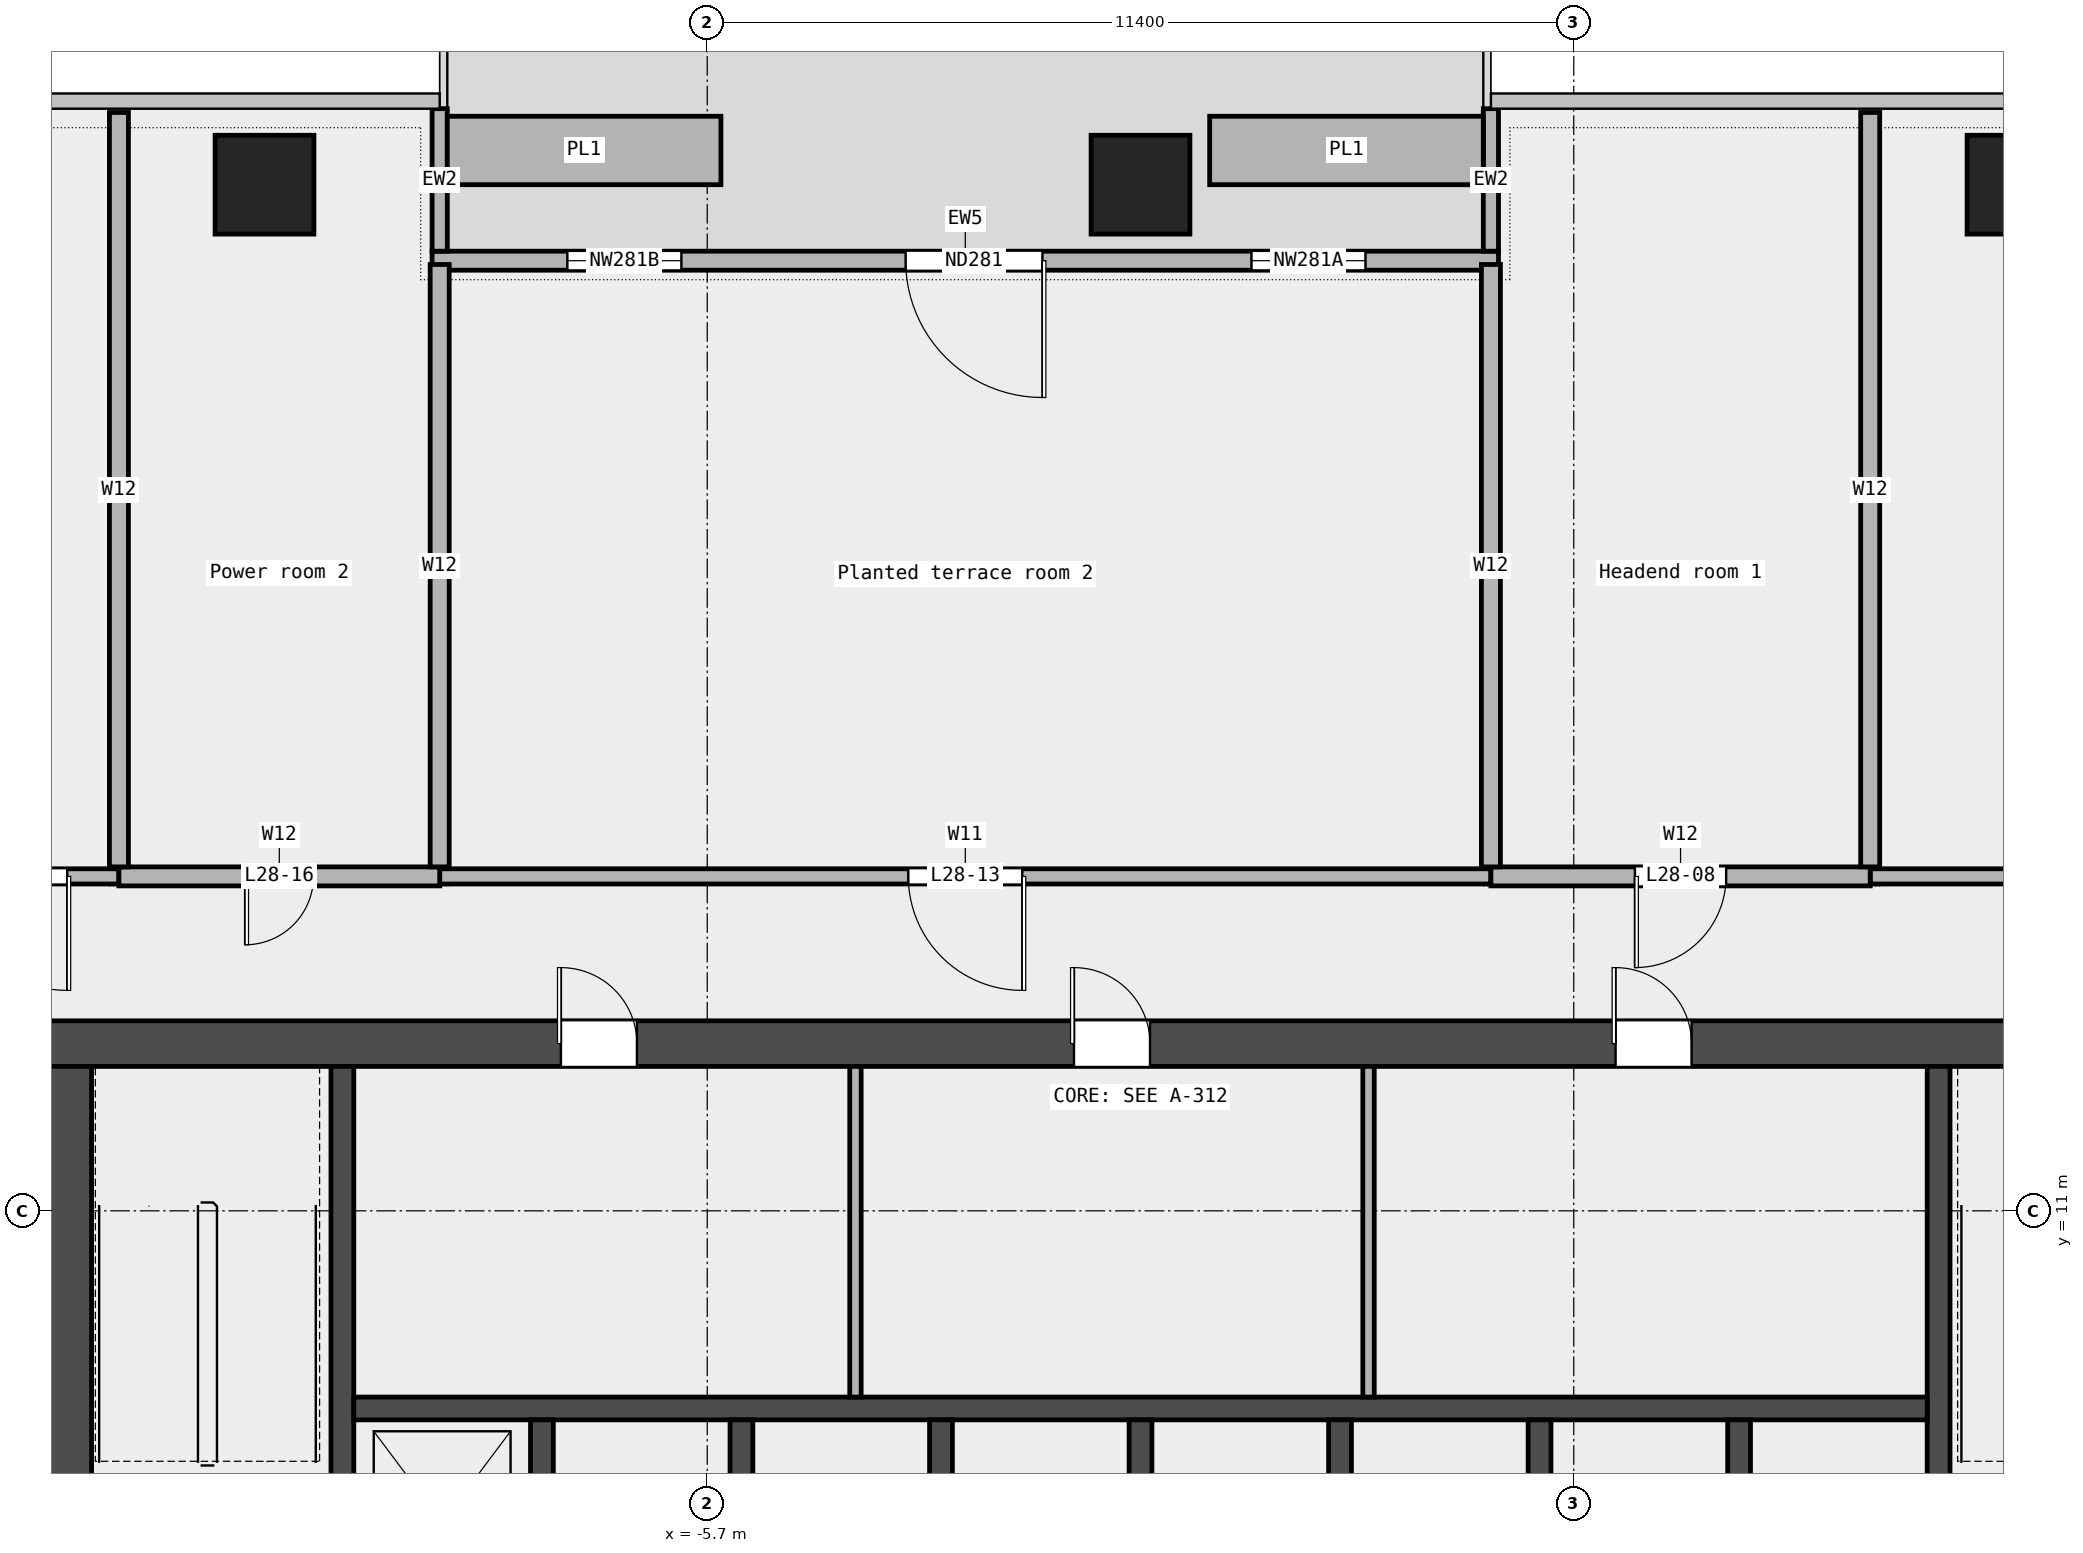
"""IFC4 building model, lengths in metres.
Left out: names, types, materials, properties, quantities, classifications, styles, units other than length and angle.
Written with IfcOpenShell. Run it as: python <this file> out.ifc"""

import sys

from ifc_helpers import new_model, si_unit, direction, frame, frame_2d, origin, origin_2d, place, context, subcontext, project, spatial, rectangle, extrude, element, fill, save


model = new_model("IFC4")
c1 = context("Model", 3, precision=1e-05, world=origin(), true_north=direction((0.0, 1.0)))
c2 = subcontext(c1, "Body", "Model", "MODEL_VIEW")
j1 = project(units=[si_unit("LENGTHUNIT", "METRE"), si_unit("PLANEANGLEUNIT", "RADIAN")], contexts=[c1])
p1 = place(None, origin())
s1 = spatial("IfcSite", under=j1, at=p1, CompositionType="ELEMENT")
p2 = place(p1, origin())
s2 = spatial("IfcBuilding", under=s1, at=p2, CompositionType="ELEMENT")
p3 = place(p2, frame((0.0, 0.0, 139.6)))
s3 = spatial("IfcBuildingStorey", under=s2, at=p3, CompositionType="ELEMENT", Elevation=139.6)
for number, where, z_axis, x_axis in (
    (1, (11.525, 24.5, 0.0), (0.0, 0.0, 1.0), (1.0, 0.0, 0.0)),
    (2, (0.0, 24.5, 0.0), (0.0, 0.0, 1.0), (1.0, 0.0, 0.0)),
    (3, (-11.525, 24.5, 0.0), (0.0, 0.0, 1.0), (1.0, 0.0, 0.0)),
):
    element("IfcColumn", number, at=place(p3, frame(where, z_axis=z_axis, x_axis=x_axis)), inside=s3, PredefinedType="COLUMN", context=c2, shape_type="SweptSolid", body=[
        extrude(rectangle(XDim=1.3, YDim=1.3, at=origin_2d()), origin(), (0.0, 0.0, 1.0), 4.05),
    ])
p4 = place(p3, frame((4.71, 23.5, 0.0), z_axis=(0.0, 0.0, 1.0), x_axis=(-1.0, 0.0, 0.0)))
e4 = element("IfcWall", 4, at=p4, inside=s3, PredefinedType="STANDARD", context=c2, shape_type="SweptSolid", body=[
    extrude(rectangle(XDim=14.03, YDim=0.25, at=frame_2d((7.015, 0.0))), origin(), (0.0, 0.0, 1.0), 4.05),
])
p5 = place(p4, frame((1.75, 0.0, 0.45)))
e5 = element("IfcOpeningElement", 5, at=p5, cuts=e4, PredefinedType="OPENING", context=c2, shape_type="SweptSolid", body=[
    extrude(rectangle(XDim=1.5, YDim=3.0, at=frame_2d((0.75, 1.5))), frame((0.0, 0.137, 0.0), z_axis=(0.0, -1.0, 0.0), x_axis=(1.0, 0.0, 0.0)), (0.0, 0.0, 1.0), 0.274),
])
p6 = place(p4, frame((6.0, 0.0, 0.0)))
e6 = element("IfcOpeningElement", 6, at=p6, cuts=e4, PredefinedType="OPENING", context=c2, shape_type="SweptSolid", body=[
    extrude(rectangle(XDim=1.8, YDim=2.4, at=frame_2d((0.9, 1.2))), frame((0.0, 0.137, 0.0), z_axis=(0.0, -1.0, 0.0), x_axis=(1.0, 0.0, 0.0)), (0.0, 0.0, 1.0), 0.274),
])
p7 = place(p4, frame((10.75, 0.0, 0.45)))
e7 = element("IfcOpeningElement", 7, at=p7, cuts=e4, PredefinedType="OPENING", context=c2, shape_type="SweptSolid", body=[
    extrude(rectangle(XDim=1.5, YDim=3.0, at=frame_2d((0.75, 1.5))), frame((0.0, 0.137, 0.0), z_axis=(0.0, -1.0, 0.0), x_axis=(1.0, 0.0, 0.0)), (0.0, 0.0, 1.0), 0.274),
])
for number, where, z_axis, x_axis in (
    (8, (4.61, 25.5, 0.0), (0.0, 0.0, 1.0), (0.0, -1.0, 0.0)),
    (9, (-9.22, 25.5, 0.0), (0.0, 0.0, 1.0), (0.0, -1.0, 0.0)),
):
    element("IfcWall", number, at=place(p3, frame(where, z_axis=z_axis, x_axis=x_axis)), inside=s3, PredefinedType="STANDARD", context=c2, shape_type="SweptSolid", body=[
        extrude(rectangle(XDim=1.875, YDim=0.2, at=frame_2d((0.938, 0.0))), origin(), (0.0, 0.0, 1.0), 4.05),
    ])
for number, where, z_axis, x_axis in (
    (10, (4.51, 24.95, 0.0), (0.0, 0.0, 1.0), (-1.0, 0.0, 0.0)),
    (11, (-5.52, 24.95, 0.0), (0.0, 0.0, 1.0), (-1.0, 0.0, 0.0)),
):
    element("IfcWall", number, at=place(p3, frame(where, z_axis=z_axis, x_axis=x_axis)), inside=s3, PredefinedType="STANDARD", context=c2, shape_type="SweptSolid", body=[
        extrude(rectangle(XDim=3.6, YDim=0.9, at=frame_2d((1.8, 0.0))), origin(), (0.0, 0.0, 1.0), 0.7),
    ])
p8 = place(p3, frame((-16.3, 15.4, 0.0), z_axis=(0.0, 0.0, 1.0), x_axis=(1.0, 0.0, 0.0)))
e12 = element("IfcWall", 12, at=p8, inside=s3, PredefinedType="PARTITIONING", context=c2, shape_type="SweptSolid", body=[
    extrude(rectangle(XDim=2.86, YDim=0.2, at=frame_2d((1.43, 0.0))), origin(), (0.0, 0.0, 1.0), 4.05),
])
p9 = place(p8, frame((0.68, 0.0, 0.0)))
e13 = element("IfcOpeningElement", 13, at=p9, cuts=e12, PredefinedType="OPENING", context=c2, shape_type="SweptSolid", body=[
    extrude(rectangle(XDim=1.5, YDim=2.1, at=frame_2d((0.75, 1.05))), frame((0.0, 0.112, 0.0), z_axis=(0.0, -1.0, 0.0), x_axis=(1.0, 0.0, 0.0)), (0.0, 0.0, 1.0), 0.224),
])
p10 = place(p3, frame((-9.22, 15.4, 0.0), z_axis=(0.0, 0.0, 1.0), x_axis=(1.0, 0.0, 0.0)))
e14 = element("IfcWall", 14, at=p10, inside=s3, PredefinedType="PARTITIONING", context=c2, shape_type="SweptSolid", body=[
    extrude(rectangle(XDim=13.83, YDim=0.2, at=frame_2d((6.915, 0.0))), origin(), (0.0, 0.0, 1.0), 4.05),
])
p11 = place(p10, frame((6.165, 0.0, 0.0)))
e15 = element("IfcOpeningElement", 15, at=p11, cuts=e14, PredefinedType="OPENING", context=c2, shape_type="SweptSolid", body=[
    extrude(rectangle(XDim=1.5, YDim=2.1, at=frame_2d((0.75, 1.05))), frame((0.0, 0.112, 0.0), z_axis=(0.0, -1.0, 0.0), x_axis=(1.0, 0.0, 0.0)), (0.0, 0.0, 1.0), 0.224),
])
p12 = place(p3, frame((9.6, 15.4, 0.0), z_axis=(0.0, 0.0, 1.0), x_axis=(1.0, 0.0, 0.0)))
e16 = element("IfcWall", 16, at=p12, inside=s3, PredefinedType="PARTITIONING", context=c2, shape_type="SweptSolid", body=[
    extrude(rectangle(XDim=6.7, YDim=0.2, at=frame_2d((3.35, 0.0))), origin(), (0.0, 0.0, 1.0), 4.05),
])
p13 = place(p12, frame((2.45, 0.0, 0.0)))
e17 = element("IfcOpeningElement", 17, at=p13, cuts=e16, PredefinedType="OPENING", context=c2, shape_type="SweptSolid", body=[
    extrude(rectangle(XDim=1.8, YDim=2.1, at=frame_2d((0.9, 1.05))), frame((0.0, 0.112, 0.0), z_axis=(0.0, -1.0, 0.0), x_axis=(1.0, 0.0, 0.0)), (0.0, 0.0, 1.0), 0.224),
])
p14 = place(p3, frame((-13.44, 15.4, 0.0), z_axis=(0.0, 0.0, 1.0), x_axis=(1.0, 0.0, 0.0)))
e18 = element("IfcWall", 18, at=p14, inside=s3, PredefinedType="PARTITIONING", context=c2, shape_type="SweptSolid", body=[
    extrude(rectangle(XDim=4.22, YDim=0.25, at=frame_2d((2.11, 0.0))), origin(), (0.0, 0.0, 1.0), 4.05),
])
p15 = place(p14, frame((1.66, 0.0, 0.0)))
e19 = element("IfcOpeningElement", 19, at=p15, cuts=e18, PredefinedType="OPENING", context=c2, shape_type="SweptSolid", body=[
    extrude(rectangle(XDim=0.9, YDim=2.1, at=frame_2d((0.45, 1.05))), frame((0.0, 0.137, 0.0), z_axis=(0.0, -1.0, 0.0), x_axis=(1.0, 0.0, 0.0)), (0.0, 0.0, 1.0), 0.274),
])
p16 = place(p3, frame((4.61, 15.4, 0.0), z_axis=(0.0, 0.0, 1.0), x_axis=(1.0, 0.0, 0.0)))
e20 = element("IfcWall", 20, at=p16, inside=s3, PredefinedType="PARTITIONING", context=c2, shape_type="SweptSolid", body=[
    extrude(rectangle(XDim=4.99, YDim=0.25, at=frame_2d((2.495, 0.0))), origin(), (0.0, 0.0, 1.0), 4.05),
])
p17 = place(p16, frame((1.895, 0.0, 0.0)))
e21 = element("IfcOpeningElement", 21, at=p17, cuts=e20, PredefinedType="OPENING", context=c2, shape_type="SweptSolid", body=[
    extrude(rectangle(XDim=1.2, YDim=2.1, at=frame_2d((0.6, 1.05))), frame((0.0, 0.137, 0.0), z_axis=(0.0, -1.0, 0.0), x_axis=(1.0, 0.0, 0.0)), (0.0, 0.0, 1.0), 0.274),
])
p18 = place(p3, frame((-13.44, 15.525, 0.0), z_axis=(0.0, 0.0, 1.0), x_axis=(0.0, 1.0, 0.0)))
e22 = element("IfcWall", 22, at=p18, inside=s3, PredefinedType="PARTITIONING", context=c2, shape_type="SweptSolid", body=[
    extrude(rectangle(XDim=9.925, YDim=0.25, at=frame_2d((4.962, 0.0))), origin(), (0.0, 0.0, 1.0), 4.05),
])
for number, where, z_axis, x_axis in (
    (23, (-9.22, 15.525, 0.0), (0.0, 0.0, 1.0), (0.0, 1.0, 0.0)),
    (24, (4.61, 15.525, 0.0), (0.0, 0.0, 1.0), (0.0, 1.0, 0.0)),
):
    element("IfcWall", number, at=place(p3, frame(where, z_axis=z_axis, x_axis=x_axis)), inside=s3, PredefinedType="PARTITIONING", context=c2, shape_type="SweptSolid", body=[
        extrude(rectangle(XDim=7.925, YDim=0.25, at=frame_2d((3.962, 0.0))), origin(), (0.0, 0.0, 1.0), 4.05),
    ])
p19 = place(p3, frame((9.6, 15.525, 0.0), z_axis=(0.0, 0.0, 1.0), x_axis=(0.0, 1.0, 0.0)))
e25 = element("IfcWall", 25, at=p19, inside=s3, PredefinedType="PARTITIONING", context=c2, shape_type="SweptSolid", body=[
    extrude(rectangle(XDim=9.925, YDim=0.25, at=frame_2d((4.962, 0.0))), origin(), (0.0, 0.0, 1.0), 4.05),
])
p20 = place(p3, frame((-14.4, 13.2, 0.0), z_axis=(0.0, 0.0, 1.0), x_axis=(1.0, 0.0, 0.0)))
e26 = element("IfcWall", 26, at=p20, inside=s3, PredefinedType="SHEAR", context=c2, shape_type="SweptSolid", body=[
    extrude(rectangle(XDim=28.8, YDim=0.6, at=frame_2d((14.4, 0.0))), origin(), (0.0, 0.0, 1.0), 4.2),
])
p21 = place(p20, frame((6.775, 0.0, 0.0)))
e27 = element("IfcOpeningElement", 27, at=p21, cuts=e26, PredefinedType="OPENING", context=c2, shape_type="SweptSolid", body=[
    extrude(rectangle(XDim=1.0, YDim=2.1, at=frame_2d((0.5, 1.05))), frame((0.0, 0.312, 0.0), z_axis=(0.0, -1.0, 0.0), x_axis=(1.0, 0.0, 0.0)), (0.0, 0.0, 1.0), 0.624),
])
p22 = place(p20, frame((13.525, 0.0, 0.0)))
e28 = element("IfcOpeningElement", 28, at=p22, cuts=e26, PredefinedType="OPENING", context=c2, shape_type="SweptSolid", body=[
    extrude(rectangle(XDim=1.0, YDim=2.1, at=frame_2d((0.5, 1.05))), frame((0.0, 0.312, 0.0), z_axis=(0.0, -1.0, 0.0), x_axis=(1.0, 0.0, 0.0)), (0.0, 0.0, 1.0), 0.624),
])
p23 = place(p20, frame((20.65, 0.0, 0.0)))
e29 = element("IfcOpeningElement", 29, at=p23, cuts=e26, PredefinedType="OPENING", context=c2, shape_type="SweptSolid", body=[
    extrude(rectangle(XDim=1.0, YDim=2.1, at=frame_2d((0.5, 1.05))), frame((0.0, 0.312, 0.0), z_axis=(0.0, -1.0, 0.0), x_axis=(1.0, 0.0, 0.0)), (0.0, 0.0, 1.0), 0.624),
])
p24 = place(p3, frame((-14.1, -6.6, 0.0), z_axis=(0.0, 0.0, 1.0), x_axis=(0.0, 1.0, 0.0)))
e30 = element("IfcWall", 30, at=p24, inside=s3, PredefinedType="SHEAR", context=c2, shape_type="SweptSolid", body=[
    extrude(rectangle(XDim=19.5, YDim=0.6, at=frame_2d((9.75, 0.0))), origin(), (0.0, 0.0, 1.0), 4.2),
])
p25 = place(p24, frame((9.3, 0.0, 0.0)))
e31 = element("IfcOpeningElement", 31, at=p25, cuts=e30, PredefinedType="OPENING", context=c2, shape_type="SweptSolid", body=[
    extrude(rectangle(XDim=1.8, YDim=2.1, at=frame_2d((0.9, 1.05))), frame((0.0, 0.312, 0.0), z_axis=(0.0, -1.0, 0.0), x_axis=(1.0, 0.0, 0.0)), (0.0, 0.0, 1.0), 0.624),
])
for number, where, z_axis, x_axis in (
    (32, (-10.5, 5.25, 0.0), (0.0, 0.0, 1.0), (0.0, 1.0, 0.0)),
    (33, (10.5, 5.25, 0.0), (0.0, 0.0, 1.0), (0.0, 1.0, 0.0)),
):
    element("IfcWall", number, at=place(p3, frame(where, z_axis=z_axis, x_axis=x_axis)), inside=s3, PredefinedType="SHEAR", context=c2, shape_type="SweptSolid", body=[
        extrude(rectangle(XDim=7.65, YDim=0.3, at=frame_2d((3.825, 0.0))), origin(), (0.0, 0.0, 1.0), 4.2),
    ])
p26 = place(p3, frame((-10.35, 8.4, 0.0), z_axis=(0.0, 0.0, 1.0), x_axis=(1.0, 0.0, 0.0)))
e34 = element("IfcWall", 34, at=p26, inside=s3, PredefinedType="SOLIDWALL", context=c2, shape_type="SweptSolid", body=[
    extrude(rectangle(XDim=20.7, YDim=0.3, at=frame_2d((10.35, 0.0))), origin(), (0.0, 0.0, 1.0), 4.2),
])
for number, where, z_axis, x_axis in (
    (35, (-7.875, 5.55, 0.0), (0.0, 0.0, 1.0), (0.0, 1.0, 0.0)),
    (36, (-5.25, 5.55, 0.0), (0.0, 0.0, 1.0), (0.0, 1.0, 0.0)),
    (37, (-2.625, 5.55, 0.0), (0.0, 0.0, 1.0), (0.0, 1.0, 0.0)),
    (38, (0.0, 5.55, 0.0), (0.0, 0.0, 1.0), (0.0, 1.0, 0.0)),
    (39, (2.625, 5.55, 0.0), (0.0, 0.0, 1.0), (0.0, 1.0, 0.0)),
    (40, (5.25, 5.55, 0.0), (0.0, 0.0, 1.0), (0.0, 1.0, 0.0)),
    (41, (7.875, 5.55, 0.0), (0.0, 0.0, 1.0), (0.0, 1.0, 0.0)),
):
    element("IfcWall", number, at=place(p3, frame(where, z_axis=z_axis, x_axis=x_axis)), inside=s3, PredefinedType="SOLIDWALL", context=c2, shape_type="SweptSolid", body=[
        extrude(rectangle(XDim=2.7, YDim=0.3, at=frame_2d((1.35, 0.0))), origin(), (0.0, 0.0, 1.0), 4.2),
    ])
for number, where, z_axis, x_axis in (
    (42, (-3.75, 8.55, 0.0), (0.0, 0.0, 1.0), (0.0, 1.0, 0.0)),
    (43, (3.0, 8.55, 0.0), (0.0, 0.0, 1.0), (0.0, 1.0, 0.0)),
):
    element("IfcWall", number, at=place(p3, frame(where, z_axis=z_axis, x_axis=x_axis)), inside=s3, PredefinedType="PARTITIONING", context=c2, shape_type="SweptSolid", body=[
        extrude(rectangle(XDim=4.35, YDim=0.15, at=frame_2d((2.175, 0.0))), origin(), (0.0, 0.0, 1.0), 4.2),
    ])
p27 = place(p5, origin())
e44 = element("IfcWindow", 44, at=p27, inside=s3, PartitioningType="SINGLE_PANEL", PredefinedType="WINDOW", context=c2, shape_type="SweptSolid", body=[
    extrude(rectangle(XDim=1.5, YDim=3.0, at=frame_2d((0.75, 1.5))), frame((0.0, 0.03, 0.0), z_axis=(0.0, -1.0, 0.0), x_axis=(1.0, 0.0, 0.0)), (0.0, 0.0, 1.0), 0.06),
])
fill(e5, e44)
p28 = place(p6, origin())
e45 = element("IfcDoor", 45, at=p28, inside=s3, OperationType="DOUBLE_DOOR_SINGLE_SWING", PredefinedType="DOOR", context=c2, shape_type="SweptSolid", body=[
    extrude(rectangle(XDim=1.8, YDim=2.4, at=frame_2d((0.9, 1.2))), frame((0.0, 0.025, 0.0), z_axis=(0.0, -1.0, 0.0), x_axis=(1.0, 0.0, 0.0)), (0.0, 0.0, 1.0), 0.05),
])
fill(e6, e45)
p29 = place(p7, origin())
e46 = element("IfcWindow", 46, at=p29, inside=s3, PartitioningType="SINGLE_PANEL", PredefinedType="WINDOW", context=c2, shape_type="SweptSolid", body=[
    extrude(rectangle(XDim=1.5, YDim=3.0, at=frame_2d((0.75, 1.5))), frame((0.0, 0.03, 0.0), z_axis=(0.0, -1.0, 0.0), x_axis=(1.0, 0.0, 0.0)), (0.0, 0.0, 1.0), 0.06),
])
fill(e7, e46)
p30 = place(p17, origin())
e47 = element("IfcDoor", 47, at=p30, inside=s3, OperationType="SINGLE_SWING_RIGHT", PredefinedType="DOOR", context=c2, shape_type="SweptSolid", body=[
    extrude(rectangle(XDim=1.2, YDim=2.1, at=frame_2d((0.6, 1.05))), frame((0.0, 0.025, 0.0), z_axis=(0.0, -1.0, 0.0), x_axis=(1.0, 0.0, 0.0)), (0.0, 0.0, 1.0), 0.05),
])
fill(e21, e47)
p31 = place(p9, origin())
e48 = element("IfcDoor", 48, at=p31, inside=s3, OperationType="DOUBLE_DOOR_SINGLE_SWING", PredefinedType="DOOR", context=c2, shape_type="SweptSolid", body=[
    extrude(rectangle(XDim=1.5, YDim=2.1, at=frame_2d((0.75, 1.05))), frame((0.0, 0.025, 0.0), z_axis=(0.0, -1.0, 0.0), x_axis=(1.0, 0.0, 0.0)), (0.0, 0.0, 1.0), 0.05),
])
fill(e13, e48)
p32 = place(p11, origin())
e49 = element("IfcDoor", 49, at=p32, inside=s3, OperationType="DOUBLE_DOOR_SINGLE_SWING", PredefinedType="DOOR", context=c2, shape_type="SweptSolid", body=[
    extrude(rectangle(XDim=1.5, YDim=2.1, at=frame_2d((0.75, 1.05))), frame((0.0, 0.025, 0.0), z_axis=(0.0, -1.0, 0.0), x_axis=(1.0, 0.0, 0.0)), (0.0, 0.0, 1.0), 0.05),
])
fill(e15, e49)
p33 = place(p15, origin())
e50 = element("IfcDoor", 50, at=p33, inside=s3, OperationType="SINGLE_SWING_RIGHT", PredefinedType="DOOR", context=c2, shape_type="SweptSolid", body=[
    extrude(rectangle(XDim=0.9, YDim=2.1, at=frame_2d((0.45, 1.05))), frame((0.0, 0.025, 0.0), z_axis=(0.0, -1.0, 0.0), x_axis=(1.0, 0.0, 0.0)), (0.0, 0.0, 1.0), 0.05),
])
fill(e19, e50)
p34 = place(p21, origin())
e51 = element("IfcDoor", 51, at=p34, inside=s3, OperationType="SINGLE_SWING_LEFT", PredefinedType="DOOR", context=c2, shape_type="SweptSolid", body=[
    extrude(rectangle(XDim=1.0, YDim=2.1, at=frame_2d((0.5, 1.05))), frame((0.0, 0.025, 0.0), z_axis=(0.0, -1.0, 0.0), x_axis=(1.0, 0.0, 0.0)), (0.0, 0.0, 1.0), 0.05),
])
fill(e27, e51)
p35 = place(p22, origin())
e52 = element("IfcDoor", 52, at=p35, inside=s3, OperationType="SINGLE_SWING_LEFT", PredefinedType="DOOR", context=c2, shape_type="SweptSolid", body=[
    extrude(rectangle(XDim=1.0, YDim=2.1, at=frame_2d((0.5, 1.05))), frame((0.0, 0.025, 0.0), z_axis=(0.0, -1.0, 0.0), x_axis=(1.0, 0.0, 0.0)), (0.0, 0.0, 1.0), 0.05),
])
fill(e28, e52)
p36 = place(p23, origin())
e53 = element("IfcDoor", 53, at=p36, inside=s3, OperationType="SINGLE_SWING_LEFT", PredefinedType="DOOR", context=c2, shape_type="SweptSolid", body=[
    extrude(rectangle(XDim=1.0, YDim=2.1, at=frame_2d((0.5, 1.05))), frame((0.0, 0.025, 0.0), z_axis=(0.0, -1.0, 0.0), x_axis=(1.0, 0.0, 0.0)), (0.0, 0.0, 1.0), 0.05),
])
fill(e29, e53)
save(model, sys.argv[1])
